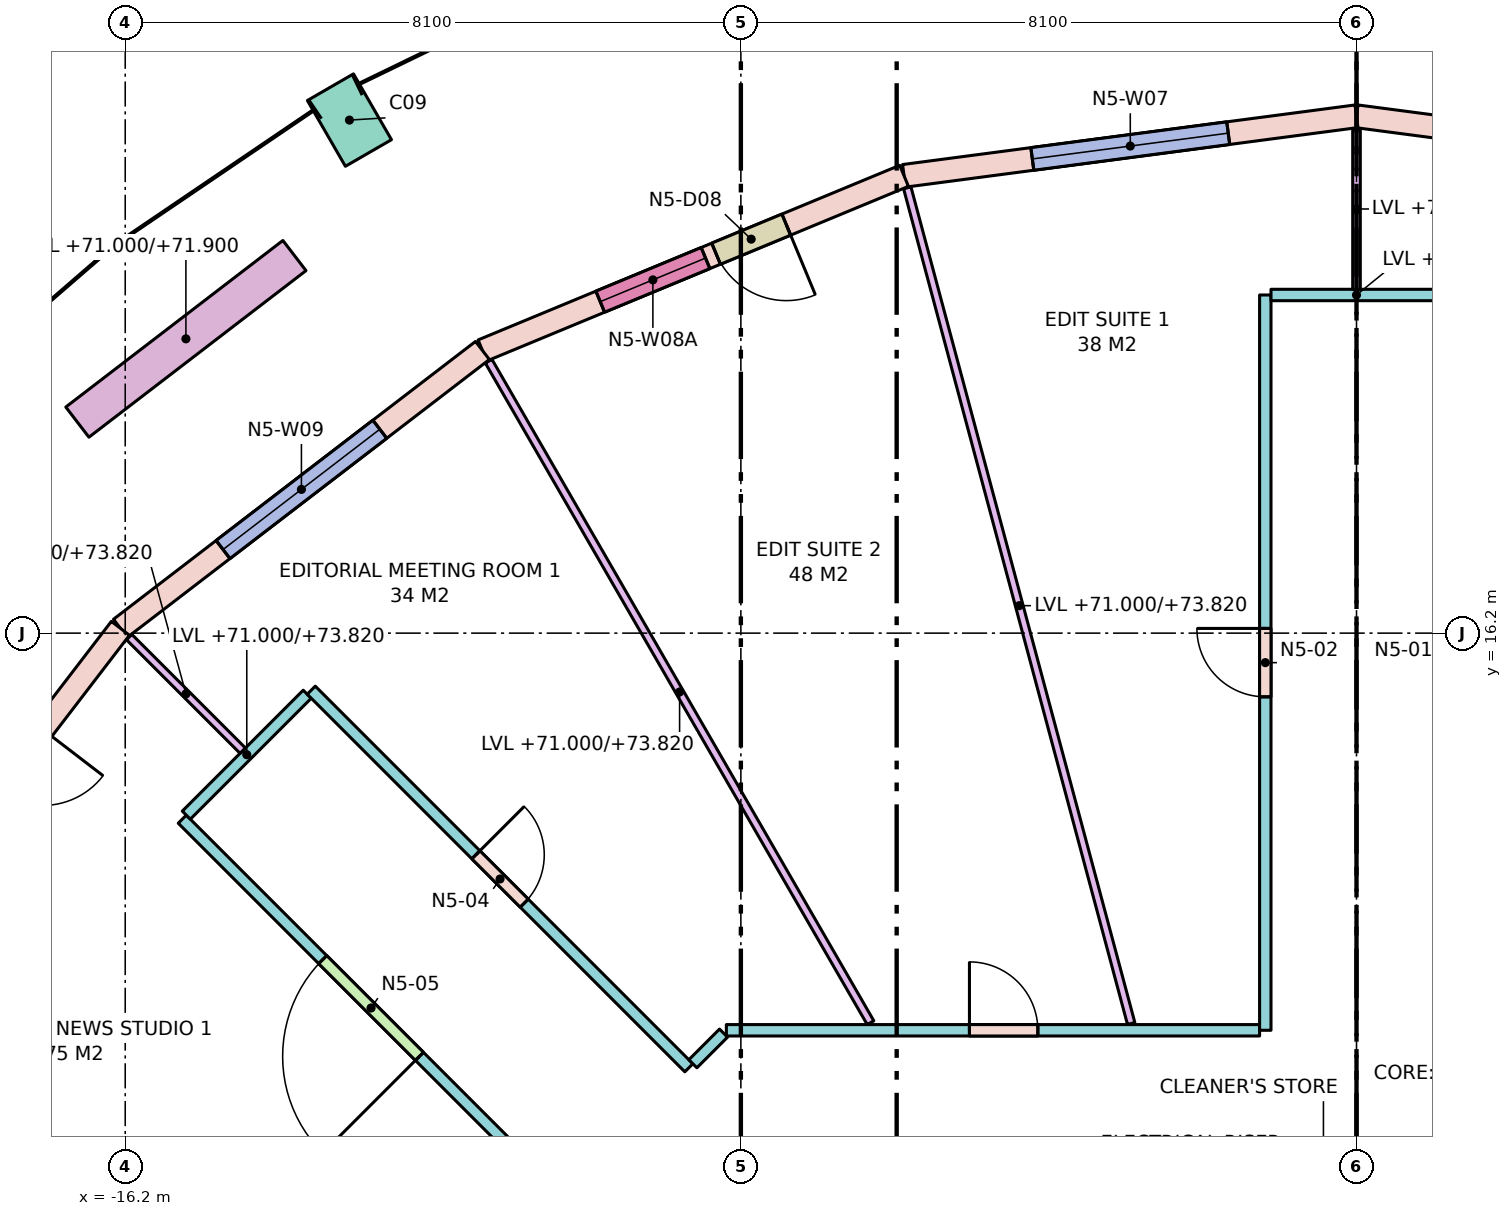
"""IFC4 building model, lengths in metres.
Left out: names, types, materials, properties, quantities, classifications, styles, units other than length and angle.
Written with IfcOpenShell. Run it as: python <this file> out.ifc"""

import sys

from ifc_helpers import new_model, si_unit, direction, frame, frame_2d, origin, origin_2d, place, context, subcontext, project, spatial, rectangle, extrude, element, fill, save


model = new_model("IFC4")
c1 = context("Model", 3, precision=1e-05, world=origin(), true_north=direction((0.0, 1.0)))
c2 = subcontext(c1, "Body", "Model", "MODEL_VIEW")
j1 = project(units=[si_unit("LENGTHUNIT", "METRE"), si_unit("PLANEANGLEUNIT", "RADIAN")], contexts=[c1])
p1 = place(None, origin())
s1 = spatial("IfcSite", under=j1, at=p1, CompositionType="ELEMENT")
p2 = place(p1, origin())
s2 = spatial("IfcBuilding", under=s1, at=p2, CompositionType="ELEMENT")
p3 = place(p2, frame((0.0, 0.0, 71.0)))
s3 = spatial("IfcBuildingStorey", under=s2, at=p3, CompositionType="ELEMENT", Elevation=71.0)
p4 = place(p3, frame((-13.25, 22.95, 0.0), z_axis=(0.0, 0.0, 1.0), x_axis=(-0.866025403784, -0.5, 0.0)))
e1 = element("IfcColumn", 1, at=p4, inside=s3, PredefinedType="COLUMN", context=c2, shape_type="SweptSolid", body=[
    extrude(rectangle(XDim=0.7, YDim=1.0, at=origin_2d()), origin(), (0.0, 0.0, 1.0), 4.0),
])
p5 = place(p3, frame((5.953, 22.216, 0.0), z_axis=(0.0, 0.0, 1.0), x_axis=(-0.991445297315, 0.130522880875, 0.0)))
e2 = element("IfcWall", 2, at=p5, inside=s3, PredefinedType="STANDARD", context=c2, shape_type="SweptSolid", body=[
    extrude(rectangle(XDim=6.004, YDim=0.3, at=frame_2d((3.002, 0.0))), origin(), (0.0, 0.0, 1.0), 3.72),
])
p6 = place(p5, frame((1.677, 0.0, 0.0)))
e3 = element("IfcOpeningElement", 3, at=p6, cuts=e2, PredefinedType="OPENING", context=c2, shape_type="SweptSolid", body=[
    extrude(rectangle(XDim=1.0, YDim=2.4, at=frame_2d((0.5, 1.2))), frame((0.0, 0.16, 0.0), z_axis=(0.0, -1.0, 0.0), x_axis=(1.0, 0.0, 0.0)), (0.0, 0.0, 1.0), 0.32),
])
p7 = place(p5, frame((2.827, 0.0, 0.8)))
e4 = element("IfcOpeningElement", 4, at=p7, cuts=e2, PredefinedType="OPENING", context=c2, shape_type="SweptSolid", body=[
    extrude(rectangle(XDim=1.5, YDim=2.7, at=frame_2d((0.75, 1.35))), frame((0.0, 0.16, 0.0), z_axis=(0.0, -1.0, 0.0), x_axis=(1.0, 0.0, 0.0)), (0.0, 0.0, 1.0), 0.32),
])
p8 = place(p3, frame((0.0, 23.0, 0.0), z_axis=(0.0, 0.0, 1.0), x_axis=(-0.991445297315, -0.130522880875, 0.0)))
e5 = element("IfcWall", 5, at=p8, inside=s3, PredefinedType="STANDARD", context=c2, shape_type="SweptSolid", body=[
    extrude(rectangle(XDim=6.004, YDim=0.3, at=frame_2d((3.002, 0.0))), origin(), (0.0, 0.0, 1.0), 3.72),
])
p9 = place(p8, frame((1.702, 0.0, 0.8)))
e6 = element("IfcOpeningElement", 6, at=p9, cuts=e5, PredefinedType="OPENING", context=c2, shape_type="SweptSolid", body=[
    extrude(rectangle(XDim=2.6, YDim=2.7, at=frame_2d((1.3, 1.35))), frame((0.0, 0.16, 0.0), z_axis=(0.0, -1.0, 0.0), x_axis=(1.0, 0.0, 0.0)), (0.0, 0.0, 1.0), 0.32),
])
p10 = place(p3, frame((-5.953, 22.216, 0.0), z_axis=(0.0, 0.0, 1.0), x_axis=(-0.923884511653, -0.382671411433, 0.0)))
e7 = element("IfcWall", 7, at=p10, inside=s3, PredefinedType="STANDARD", context=c2, shape_type="SweptSolid", body=[
    extrude(rectangle(XDim=6.004, YDim=0.3, at=frame_2d((3.002, 0.0))), origin(), (0.0, 0.0, 1.0), 3.72),
])
p11 = place(p10, frame((1.677, 0.0, 0.0)))
e8 = element("IfcOpeningElement", 8, at=p11, cuts=e7, PredefinedType="OPENING", context=c2, shape_type="SweptSolid", body=[
    extrude(rectangle(XDim=1.0, YDim=2.4, at=frame_2d((0.5, 1.2))), frame((0.0, 0.16, 0.0), z_axis=(0.0, -1.0, 0.0), x_axis=(1.0, 0.0, 0.0)), (0.0, 0.0, 1.0), 0.32),
])
p12 = place(p10, frame((2.827, 0.0, 0.8)))
e9 = element("IfcOpeningElement", 9, at=p12, cuts=e7, PredefinedType="OPENING", context=c2, shape_type="SweptSolid", body=[
    extrude(rectangle(XDim=1.5, YDim=2.7, at=frame_2d((0.75, 1.35))), frame((0.0, 0.16, 0.0), z_axis=(0.0, -1.0, 0.0), x_axis=(1.0, 0.0, 0.0)), (0.0, 0.0, 1.0), 0.32),
])
p13 = place(p3, frame((-11.5, 19.919, 0.0), z_axis=(0.0, 0.0, 1.0), x_axis=(-0.793339924758, -0.608778912074, 0.0)))
e10 = element("IfcWall", 10, at=p13, inside=s3, PredefinedType="STANDARD", context=c2, shape_type="SweptSolid", body=[
    extrude(rectangle(XDim=6.004, YDim=0.3, at=frame_2d((3.002, 0.0))), origin(), (0.0, 0.0, 1.0), 3.72),
])
p14 = place(p13, frame((1.702, 0.0, 0.8)))
e11 = element("IfcOpeningElement", 11, at=p14, cuts=e10, PredefinedType="OPENING", context=c2, shape_type="SweptSolid", body=[
    extrude(rectangle(XDim=2.6, YDim=2.7, at=frame_2d((1.3, 1.35))), frame((0.0, 0.16, 0.0), z_axis=(0.0, -1.0, 0.0), x_axis=(1.0, 0.0, 0.0)), (0.0, 0.0, 1.0), 0.32),
])
p15 = place(p3, frame((-16.263, 16.263, 0.0), z_axis=(0.0, 0.0, 1.0), x_axis=(-0.608778912074, -0.793339924758, 0.0)))
e12 = element("IfcWall", 12, at=p15, inside=s3, PredefinedType="STANDARD", context=c2, shape_type="SweptSolid", body=[
    extrude(rectangle(XDim=6.004, YDim=0.3, at=frame_2d((3.002, 0.0))), origin(), (0.0, 0.0, 1.0), 3.72),
])
p16 = place(p15, frame((1.677, 0.0, 0.0)))
e13 = element("IfcOpeningElement", 13, at=p16, cuts=e12, PredefinedType="OPENING", context=c2, shape_type="SweptSolid", body=[
    extrude(rectangle(XDim=1.0, YDim=2.4, at=frame_2d((0.5, 1.2))), frame((0.0, 0.16, 0.0), z_axis=(0.0, -1.0, 0.0), x_axis=(1.0, 0.0, 0.0)), (0.0, 0.0, 1.0), 0.32),
])
p17 = place(p15, frame((2.827, 0.0, 0.8)))
e14 = element("IfcOpeningElement", 14, at=p17, cuts=e12, PredefinedType="OPENING", context=c2, shape_type="SweptSolid", body=[
    extrude(rectangle(XDim=1.5, YDim=2.7, at=frame_2d((0.75, 1.35))), frame((0.0, 0.16, 0.0), z_axis=(0.0, -1.0, 0.0), x_axis=(1.0, 0.0, 0.0)), (0.0, 0.0, 1.0), 0.32),
])
p18 = place(p3, frame((-13.974, 21.167, 0.0), z_axis=(0.0, 0.0, 1.0), x_axis=(-0.793359599829, -0.608753271334, 0.0)))
e15 = element("IfcWall", 15, at=p18, inside=s3, PredefinedType="PARAPET", context=c2, shape_type="SweptSolid", body=[
    extrude(rectangle(XDim=3.6, YDim=0.5, at=frame_2d((1.8, 0.0))), origin(), (0.0, 0.0, 1.0), 0.9),
])
p19 = place(p3, frame((-10.481, 8.784, 0.0), z_axis=(0.0, 0.0, 1.0), x_axis=(-0.707124155885, 0.707089406061, 0.0)))
e16 = element("IfcWall", 16, at=p19, inside=s3, PredefinedType="PARTITIONING", context=c2, shape_type="SweptSolid", body=[
    extrude(rectangle(XDim=7.026, YDim=0.15, at=frame_2d((3.513, 0.0))), origin(), (0.0, 0.0, 1.0), 3.72),
])
p20 = place(p19, frame((2.613, 0.0, 0.0)))
e17 = element("IfcOpeningElement", 17, at=p20, cuts=e16, PredefinedType="OPENING", context=c2, shape_type="SweptSolid", body=[
    extrude(rectangle(XDim=1.8, YDim=2.1, at=frame_2d((0.9, 1.05))), frame((0.0, 0.085, 0.0), z_axis=(0.0, -1.0, 0.0), x_axis=(1.0, 0.0, 0.0)), (0.0, 0.0, 1.0), 0.17),
])
p21 = place(p3, frame((-15.396, 13.805, 0.0), z_axis=(0.0, 0.0, 1.0), x_axis=(0.707106781187, 0.707106781187, 0.0)))
e18 = element("IfcWall", 18, at=p21, inside=s3, PredefinedType="PARTITIONING", context=c2, shape_type="SweptSolid", body=[
    extrude(rectangle(XDim=2.25, YDim=0.15, at=frame_2d((1.125, 0.0))), origin(), (0.0, 0.0, 1.0), 2.82),
])
p22 = place(p3, frame((-13.752, 15.449, 0.0), z_axis=(0.0, 0.0, 1.0), x_axis=(0.707089406061, -0.707124155885, 0.0)))
e19 = element("IfcWall", 19, at=p22, inside=s3, PredefinedType="PARTITIONING", context=c2, shape_type="SweptSolid", body=[
    extrude(rectangle(XDim=7.026, YDim=0.15, at=frame_2d((3.513, 0.0))), origin(), (0.0, 0.0, 1.0), 3.72),
])
p23 = place(p22, frame((3.063, 0.0, 0.0)))
e20 = element("IfcOpeningElement", 20, at=p23, cuts=e19, PredefinedType="OPENING", context=c2, shape_type="SweptSolid", body=[
    extrude(rectangle(XDim=0.9, YDim=2.1, at=frame_2d((0.45, 1.05))), frame((0.0, 0.085, 0.0), z_axis=(0.0, -1.0, 0.0), x_axis=(1.0, 0.0, 0.0)), (0.0, 0.0, 1.0), 0.17),
])
p24 = place(p3, frame((-8.731, 10.534, 0.0), z_axis=(0.0, 0.0, 1.0), x_axis=(0.707106781187, 0.707106781187, 0.0)))
e21 = element("IfcWall", 21, at=p24, inside=s3, PredefinedType="PARTITIONING", context=c2, shape_type="SweptSolid", body=[
    extrude(rectangle(XDim=0.571, YDim=0.15, at=frame_2d((0.285, 0.0))), origin(), (0.0, 0.0, 1.0), 3.72),
])
p25 = place(p3, frame((-8.291, 10.975, 0.0), z_axis=(0.0, 0.0, 1.0), x_axis=(1.0, 0.0, 0.0)))
e22 = element("IfcWall", 22, at=p25, inside=s3, PredefinedType="PARTITIONING", context=c2, shape_type="SweptSolid", body=[
    extrude(rectangle(XDim=7.016, YDim=0.15, at=frame_2d((3.508, 0.0))), origin(), (0.0, 0.0, 1.0), 2.82),
])
p26 = place(p25, frame((3.198, 0.0, 0.0)))
e23 = element("IfcOpeningElement", 23, at=p26, cuts=e22, PredefinedType="OPENING", context=c2, shape_type="SweptSolid", body=[
    extrude(rectangle(XDim=0.9, YDim=2.1, at=frame_2d((0.45, 1.05))), frame((0.0, 0.085, 0.0), z_axis=(0.0, -1.0, 0.0), x_axis=(1.0, 0.0, 0.0)), (0.0, 0.0, 1.0), 0.17),
])
p27 = place(p3, frame((-1.2, 10.975, 0.0), z_axis=(0.0, 0.0, 1.0), x_axis=(0.0, 1.0, 0.0)))
e24 = element("IfcWall", 24, at=p27, inside=s3, PredefinedType="PARTITIONING", context=c2, shape_type="SweptSolid", body=[
    extrude(rectangle(XDim=9.674, YDim=0.15, at=frame_2d((4.837, 0.0))), origin(), (0.0, 0.0, 1.0), 3.72),
])
p28 = place(p27, frame((4.387, 0.0, 0.0)))
e25 = element("IfcOpeningElement", 25, at=p28, cuts=e24, PredefinedType="OPENING", context=c2, shape_type="SweptSolid", body=[
    extrude(rectangle(XDim=0.9, YDim=2.1, at=frame_2d((0.45, 1.05))), frame((0.0, 0.085, 0.0), z_axis=(0.0, -1.0, 0.0), x_axis=(1.0, 0.0, 0.0)), (0.0, 0.0, 1.0), 0.17),
])
p29 = place(p3, frame((-1.125, 20.649, 0.0), z_axis=(0.0, 0.0, 1.0), x_axis=(1.0, 0.0, 0.0)))
e26 = element("IfcWall", 26, at=p29, inside=s3, PredefinedType="PARTITIONING", context=c2, shape_type="SweptSolid", body=[
    extrude(rectangle(XDim=2.25, YDim=0.15, at=frame_2d((1.125, 0.0))), origin(), (0.0, 0.0, 1.0), 2.82),
])
p30 = place(p3, frame((0.0, 20.724, 0.0), z_axis=(0.0, 0.0, 1.0), x_axis=(0.0, 1.0, 0.0)))
e27 = element("IfcWall", 27, at=p30, inside=s3, PredefinedType="PARTITIONING", context=c2, shape_type="SweptSolid", body=[
    extrude(rectangle(XDim=2.113, YDim=0.1, at=frame_2d((1.057, 0.0))), origin(), (0.0, 0.0, 1.0), 2.82),
])
p31 = place(p3, frame((-2.965, 11.064, 0.0), z_axis=(0.0, 0.0, 1.0), x_axis=(-0.258827930947, 0.965923445291, 0.0)))
e28 = element("IfcWall", 28, at=p31, inside=s3, PredefinedType="PARTITIONING", context=c2, shape_type="SweptSolid", body=[
    extrude(rectangle(XDim=11.382, YDim=0.1, at=frame_2d((5.691, 0.0))), origin(), (0.0, 0.0, 1.0), 2.82),
])
p32 = place(p3, frame((-6.394, 11.075, 0.0), z_axis=(0.0, 0.0, 1.0), x_axis=(-0.500024592647, 0.866011204747, 0.0)))
e29 = element("IfcWall", 29, at=p32, inside=s3, PredefinedType="PARTITIONING", context=c2, shape_type="SweptSolid", body=[
    extrude(rectangle(XDim=10.049, YDim=0.1, at=frame_2d((5.024, 0.0))), origin(), (0.0, 0.0, 1.0), 2.82),
])
p33 = place(p3, frame((-14.654, 14.654, 0.0), z_axis=(0.0, 0.0, 1.0), x_axis=(-0.707106781187, 0.707106781187, 0.0)))
e30 = element("IfcWall", 30, at=p33, inside=s3, PredefinedType="PARTITIONING", context=c2, shape_type="SweptSolid", body=[
    extrude(rectangle(XDim=2.113, YDim=0.1, at=frame_2d((1.057, 0.0))), origin(), (0.0, 0.0, 1.0), 2.82),
])
p34 = place(p9, origin())
e31 = element("IfcWindow", 31, at=p34, inside=s3, PartitioningType="SINGLE_PANEL", PredefinedType="WINDOW", context=c2, shape_type="SweptSolid", body=[
    extrude(rectangle(XDim=2.6, YDim=2.7, at=frame_2d((1.3, 1.35))), frame((0.0, 0.03, 0.0), z_axis=(0.0, -1.0, 0.0), x_axis=(1.0, 0.0, 0.0)), (0.0, 0.0, 1.0), 0.06),
])
fill(e6, e31)
p35 = place(p11, origin())
e32 = element("IfcDoor", 32, at=p35, inside=s3, OperationType="SINGLE_SWING_LEFT", PredefinedType="DOOR", context=c2, shape_type="SweptSolid", body=[
    extrude(rectangle(XDim=1.0, YDim=2.4, at=frame_2d((0.5, 1.2))), frame((0.0, 0.025, 0.0), z_axis=(0.0, -1.0, 0.0), x_axis=(1.0, 0.0, 0.0)), (0.0, 0.0, 1.0), 0.05),
])
fill(e8, e32)
p36 = place(p12, origin())
e33 = element("IfcWindow", 33, at=p36, inside=s3, PartitioningType="SINGLE_PANEL", PredefinedType="WINDOW", context=c2, shape_type="SweptSolid", body=[
    extrude(rectangle(XDim=1.5, YDim=2.7, at=frame_2d((0.75, 1.35))), frame((0.0, 0.03, 0.0), z_axis=(0.0, -1.0, 0.0), x_axis=(1.0, 0.0, 0.0)), (0.0, 0.0, 1.0), 0.06),
])
fill(e9, e33)
p37 = place(p14, origin())
e34 = element("IfcWindow", 34, at=p37, inside=s3, PartitioningType="SINGLE_PANEL", PredefinedType="WINDOW", context=c2, shape_type="SweptSolid", body=[
    extrude(rectangle(XDim=2.6, YDim=2.7, at=frame_2d((1.3, 1.35))), frame((0.0, 0.03, 0.0), z_axis=(0.0, -1.0, 0.0), x_axis=(1.0, 0.0, 0.0)), (0.0, 0.0, 1.0), 0.06),
])
fill(e11, e34)
p38 = place(p28, origin())
e35 = element("IfcDoor", 35, at=p38, inside=s3, OperationType="SINGLE_SWING_RIGHT", PredefinedType="DOOR", context=c2, shape_type="SweptSolid", body=[
    extrude(rectangle(XDim=0.9, YDim=2.1, at=frame_2d((0.45, 1.05))), frame((0.0, 0.025, 0.0), z_axis=(0.0, -1.0, 0.0), x_axis=(1.0, 0.0, 0.0)), (0.0, 0.0, 1.0), 0.05),
])
fill(e25, e35)
p39 = place(p26, origin())
e36 = element("IfcDoor", 36, at=p39, inside=s3, OperationType="SINGLE_SWING_LEFT", PredefinedType="DOOR", context=c2, shape_type="SweptSolid", body=[
    extrude(rectangle(XDim=0.9, YDim=2.1, at=frame_2d((0.45, 1.05))), frame((0.0, 0.025, 0.0), z_axis=(0.0, -1.0, 0.0), x_axis=(1.0, 0.0, 0.0)), (0.0, 0.0, 1.0), 0.05),
])
fill(e23, e36)
p40 = place(p23, origin())
e37 = element("IfcDoor", 37, at=p40, inside=s3, OperationType="SINGLE_SWING_LEFT", PredefinedType="DOOR", context=c2, shape_type="SweptSolid", body=[
    extrude(rectangle(XDim=0.9, YDim=2.1, at=frame_2d((0.45, 1.05))), frame((0.0, 0.025, 0.0), z_axis=(0.0, -1.0, 0.0), x_axis=(1.0, 0.0, 0.0)), (0.0, 0.0, 1.0), 0.05),
])
fill(e20, e37)
p41 = place(p20, origin())
e38 = element("IfcDoor", 38, at=p41, inside=s3, OperationType="DOUBLE_DOOR_SINGLE_SWING", PredefinedType="DOOR", context=c2, shape_type="SweptSolid", body=[
    extrude(rectangle(XDim=1.8, YDim=2.1, at=frame_2d((0.9, 1.05))), frame((0.0, 0.025, 0.0), z_axis=(0.0, -1.0, 0.0), x_axis=(1.0, 0.0, 0.0)), (0.0, 0.0, 1.0), 0.05),
])
fill(e17, e38)
save(model, sys.argv[1])
